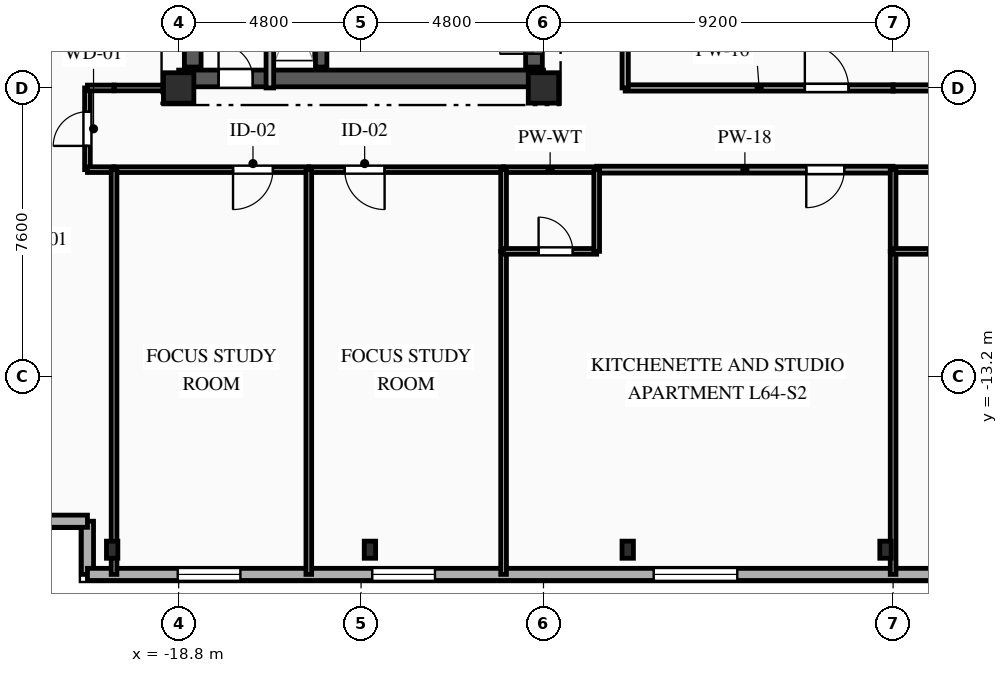
"""IFC4 building model, lengths in metres.
Left out: names, types, materials, properties, quantities, classifications, styles, units other than length and angle.
Written with IfcOpenShell. Run it as: python <this file> out.ifc"""

import sys

from ifc_helpers import new_model, si_unit, direction, frame, frame_2d, origin, origin_2d, place, context, subcontext, project, spatial, rectangle, i_section, extrude, element, fill, save


model = new_model("IFC4")
c1 = context("Model", 3, precision=1e-05, world=origin(), true_north=direction((0.0, 1.0)))
c2 = subcontext(c1, "Body", "Model", "MODEL_VIEW")
j1 = project(units=[si_unit("LENGTHUNIT", "METRE"), si_unit("PLANEANGLEUNIT", "RADIAN")], contexts=[c1])
p1 = place(None, origin())
s1 = spatial("IfcSite", under=j1, at=p1, CompositionType="ELEMENT")
p2 = place(p1, origin())
s2 = spatial("IfcBuilding", under=s1, at=p2, CompositionType="ELEMENT")
p3 = place(p2, frame((0.0, 0.0, 228.3)))
s3 = spatial("IfcBuildingStorey", under=s2, at=p3, CompositionType="ELEMENT", Elevation=228.3)
for number, where, z_axis, x_axis in (
    (1, (-18.8, -5.6, 0.0), (0.0, 0.0, 1.0), (1.0, 0.0, 0.0)),
    (2, (-9.2, -5.6, 0.0), (0.0, 0.0, 1.0), (1.0, 0.0, 0.0)),
):
    element("IfcColumn", number, at=place(p3, frame(where, z_axis=z_axis, x_axis=x_axis)), inside=s3, PredefinedType="COLUMN", context=c2, shape_type="SweptSolid", body=[
        extrude(rectangle(XDim=0.8, YDim=0.8, at=origin_2d()), origin(), (0.0, 0.0, 1.0), 3.35),
    ])
for number, where, z_axis, x_axis in (
    (3, (-20.55, -17.75, 0.0), (0.0, 0.0, 1.0), (1.0, 0.0, 0.0)),
    (4, (-13.767, -17.75, 0.0), (0.0, 0.0, 1.0), (1.0, 0.0, 0.0)),
    (5, (-6.983, -17.75, 0.0), (0.0, 0.0, 1.0), (1.0, 0.0, 0.0)),
    (6, (-0.2, -17.75, 0.0), (0.0, 0.0, 1.0), (1.0, 0.0, 0.0)),
):
    element("IfcColumn", number, at=place(p3, frame(where, z_axis=z_axis, x_axis=x_axis)), inside=s3, PredefinedType="COLUMN", context=c2, shape_type="SweptSolid", body=[
        extrude(i_section(OverallWidth=0.3, OverallDepth=0.45, WebThickness=0.014, FlangeThickness=0.026, FilletRadius=0.027, at=origin_2d()), origin(), (0.0, 0.0, 1.0), 3.35),
    ])
p4 = place(p3, frame((-21.2, -18.4, 0.0), z_axis=(0.0, 0.0, 1.0), x_axis=(0.0, 1.0, 0.0)))
e7 = element("IfcWall", 7, at=p4, inside=s3, PredefinedType="SOLIDWALL", context=c2, shape_type="SweptSolid", body=[
    extrude(rectangle(XDim=1.4, YDim=0.32, at=frame_2d((0.7, 0.0))), origin(), (0.0, 0.0, 1.0), 3.04),
])
p5 = place(p3, frame((-21.2, -17.0, 0.0), z_axis=(0.0, 0.0, 1.0), x_axis=(-1.0, 0.0, 0.0)))
e8 = element("IfcWall", 8, at=p5, inside=s3, PredefinedType="SOLIDWALL", context=c2, shape_type="SweptSolid", body=[
    extrude(rectangle(XDim=1.4, YDim=0.32, at=frame_2d((0.7, 0.0))), origin(), (0.0, 0.0, 1.0), 3.04),
])
p6 = place(p3, frame((20.8, -18.4, 0.0), z_axis=(0.0, 0.0, 1.0), x_axis=(-1.0, 0.0, 0.0)))
e9 = element("IfcWall", 9, at=p6, inside=s3, PredefinedType="SOLIDWALL", context=c2, shape_type="SweptSolid", body=[
    extrude(rectangle(XDim=42.0, YDim=0.32, at=frame_2d((21.0, 0.0))), origin(), (0.0, 0.0, 1.0), 3.04),
])
p7 = place(p6, frame((2.135, 0.0, 0.85)))
e10 = element("IfcOpeningElement", 10, at=p7, cuts=e9, PredefinedType="OPENING", context=c2, shape_type="SweptSolid", body=[
    extrude(rectangle(XDim=1.65, YDim=1.85, at=frame_2d((0.825, 0.925))), frame((0.0, 0.17, 0.0), z_axis=(0.0, -1.0, 0.0), x_axis=(1.0, 0.0, 0.0)), (0.0, 0.0, 1.0), 0.34),
])
p8 = place(p6, frame((7.175, 0.0, 0.85)))
e11 = element("IfcOpeningElement", 11, at=p8, cuts=e9, PredefinedType="OPENING", context=c2, shape_type="SweptSolid", body=[
    extrude(rectangle(XDim=1.65, YDim=1.85, at=frame_2d((0.825, 0.925))), frame((0.0, 0.17, 0.0), z_axis=(0.0, -1.0, 0.0), x_axis=(1.0, 0.0, 0.0)), (0.0, 0.0, 1.0), 0.34),
])
p9 = place(p6, frame((14.58, 0.0, 0.85)))
e12 = element("IfcOpeningElement", 12, at=p9, cuts=e9, PredefinedType="OPENING", context=c2, shape_type="SweptSolid", body=[
    extrude(rectangle(XDim=2.2, YDim=1.85, at=frame_2d((1.1, 0.925))), frame((0.0, 0.17, 0.0), z_axis=(0.0, -1.0, 0.0), x_axis=(1.0, 0.0, 0.0)), (0.0, 0.0, 1.0), 0.34),
])
p10 = place(p6, frame((24.9, 0.0, 0.85)))
e13 = element("IfcOpeningElement", 13, at=p10, cuts=e9, PredefinedType="OPENING", context=c2, shape_type="SweptSolid", body=[
    extrude(rectangle(XDim=2.2, YDim=1.85, at=frame_2d((1.1, 0.925))), frame((0.0, 0.17, 0.0), z_axis=(0.0, -1.0, 0.0), x_axis=(1.0, 0.0, 0.0)), (0.0, 0.0, 1.0), 0.34),
])
p11 = place(p6, frame((32.855, 0.0, 0.85)))
e14 = element("IfcOpeningElement", 14, at=p11, cuts=e9, PredefinedType="OPENING", context=c2, shape_type="SweptSolid", body=[
    extrude(rectangle(XDim=1.65, YDim=1.85, at=frame_2d((0.825, 0.925))), frame((0.0, 0.17, 0.0), z_axis=(0.0, -1.0, 0.0), x_axis=(1.0, 0.0, 0.0)), (0.0, 0.0, 1.0), 0.34),
])
p12 = place(p6, frame((37.975, 0.0, 0.85)))
e15 = element("IfcOpeningElement", 15, at=p12, cuts=e9, PredefinedType="OPENING", context=c2, shape_type="SweptSolid", body=[
    extrude(rectangle(XDim=1.65, YDim=1.85, at=frame_2d((0.825, 0.925))), frame((0.0, 0.17, 0.0), z_axis=(0.0, -1.0, 0.0), x_axis=(1.0, 0.0, 0.0)), (0.0, 0.0, 1.0), 0.34),
])
p13 = place(p3, frame((-18.8, -5.35, 0.0), z_axis=(0.0, 0.0, 1.0), x_axis=(1.0, 0.0, 0.0)))
e16 = element("IfcWall", 16, at=p13, inside=s3, PredefinedType="SHEAR", context=c2, shape_type="SweptSolid", body=[
    extrude(rectangle(XDim=9.6, YDim=0.44, at=frame_2d((4.8, 0.0))), origin(), (0.0, 0.0, 1.0), 3.04),
])
p14 = place(p13, frame((1.05, 0.0, 0.0)))
e17 = element("IfcOpeningElement", 17, at=p14, cuts=e16, PredefinedType="OPENING", context=c2, shape_type="SweptSolid", body=[
    extrude(rectangle(XDim=0.9, YDim=2.1, at=frame_2d((0.45, 1.05))), frame((0.0, 0.23, 0.0), z_axis=(0.0, -1.0, 0.0), x_axis=(1.0, 0.0, 0.0)), (0.0, 0.0, 1.0), 0.46),
])
p15 = place(p3, frame((-18.43, -5.05, 0.0), z_axis=(0.0, 0.0, 1.0), x_axis=(0.0, 1.0, 0.0)))
e18 = element("IfcWall", 18, at=p15, inside=s3, PredefinedType="SHEAR", context=c2, shape_type="SweptSolid", body=[
    extrude(rectangle(XDim=10.1, YDim=0.44, at=frame_2d((5.05, 0.0))), origin(), (0.0, 0.0, 1.0), 3.04),
])
p16 = place(p3, frame((-9.45, -5.05, 0.0), z_axis=(0.0, 0.0, 1.0), x_axis=(0.0, 1.0, 0.0)))
e19 = element("IfcWall", 19, at=p16, inside=s3, PredefinedType="SHEAR", context=c2, shape_type="SweptSolid", body=[
    extrude(rectangle(XDim=10.1, YDim=0.44, at=frame_2d((5.05, 0.0))), origin(), (0.0, 0.0, 1.0), 3.04),
])
p17 = place(p16, frame((7.175, 0.0, 0.0)))
e20 = element("IfcOpeningElement", 20, at=p17, cuts=e19, PredefinedType="OPENING", context=c2, shape_type="SweptSolid", body=[
    extrude(rectangle(XDim=0.9, YDim=2.1, at=frame_2d((0.45, 1.05))), frame((0.0, 0.23, 0.0), z_axis=(0.0, -1.0, 0.0), x_axis=(1.0, 0.0, 0.0)), (0.0, 0.0, 1.0), 0.46),
])
p18 = place(p16, frame((2.4, 0.0, 0.0)))
e21 = element("IfcOpeningElement", 21, at=p18, cuts=e19, PredefinedType="OPENING", context=c2, shape_type="SweptSolid", body=[
    extrude(rectangle(XDim=1.2, YDim=2.15, at=frame_2d((0.6, 1.075))), frame((0.0, 0.23, 0.0), z_axis=(0.0, -1.0, 0.0), x_axis=(1.0, 0.0, 0.0)), (0.0, 0.0, 1.0), 0.46),
])
p19 = place(p16, frame((0.35, 0.0, 0.0)))
e22 = element("IfcOpeningElement", 22, at=p19, cuts=e19, PredefinedType="OPENING", context=c2, shape_type="SweptSolid", body=[
    extrude(rectangle(XDim=0.9, YDim=2.1, at=frame_2d((0.45, 1.05))), frame((0.0, 0.23, 0.0), z_axis=(0.0, -1.0, 0.0), x_axis=(1.0, 0.0, 0.0)), (0.0, 0.0, 1.0), 0.46),
])
p20 = place(p16, frame((5.0, 0.0, 0.0)))
e23 = element("IfcOpeningElement", 23, at=p20, cuts=e19, PredefinedType="OPENING", context=c2, shape_type="SweptSolid", body=[
    extrude(rectangle(XDim=0.9, YDim=2.1, at=frame_2d((0.45, 1.05))), frame((0.0, 0.23, 0.0), z_axis=(0.0, -1.0, 0.0), x_axis=(1.0, 0.0, 0.0)), (0.0, 0.0, 1.0), 0.46),
])
p21 = place(p3, frame((-15.05, -5.05, 0.0), z_axis=(0.0, 0.0, 1.0), x_axis=(0.0, 1.0, 0.0)))
e24 = element("IfcWall", 24, at=p21, inside=s3, PredefinedType="SHEAR", context=c2, shape_type="SweptSolid", body=[
    extrude(rectangle(XDim=10.1, YDim=0.3, at=frame_2d((5.05, 0.0))), origin(), (0.0, 0.0, 1.0), 3.04),
])
p22 = place(p3, frame((-16.4, -5.6, 0.0), z_axis=(0.0, 0.0, 1.0), x_axis=(0.0, 1.0, 0.0)))
e25 = element("IfcWall", 25, at=p22, inside=s3, PredefinedType="PARTITIONING", context=c2, shape_type="SweptSolid", body=[
    extrude(rectangle(XDim=3.49, YDim=0.2, at=frame_2d((1.745, 0.0))), origin(), (0.0, 0.0, 1.0), 3.04),
])
p23 = place(p3, frame((-21.2, -7.75, 0.0), z_axis=(0.0, 0.0, 1.0), x_axis=(0.0, 1.0, 0.0)))
e26 = element("IfcWall", 26, at=p23, inside=s3, PredefinedType="PARTITIONING", context=c2, shape_type="SweptSolid", body=[
    extrude(rectangle(XDim=2.15, YDim=0.15, at=frame_2d((1.075, 0.0))), origin(), (0.0, 0.0, 1.0), 2.695),
])
p24 = place(p23, frame((0.625, 0.0, 0.0)))
e27 = element("IfcOpeningElement", 27, at=p24, cuts=e26, PredefinedType="OPENING", context=c2, shape_type="SweptSolid", body=[
    extrude(rectangle(XDim=0.9, YDim=2.1, at=frame_2d((0.45, 1.05))), frame((0.0, 0.085, 0.0), z_axis=(0.0, -1.0, 0.0), x_axis=(1.0, 0.0, 0.0)), (0.0, 0.0, 1.0), 0.17),
])
p25 = place(p3, frame((-20.5, -5.6, 0.0), z_axis=(0.0, 0.0, 1.0), x_axis=(1.0, 0.0, 0.0)))
e28 = element("IfcWall", 28, at=p25, inside=s3, PredefinedType="PARTITIONING", context=c2, shape_type="SweptSolid", body=[
    extrude(rectangle(XDim=1.7, YDim=0.15, at=frame_2d((0.85, 0.0))), origin(), (0.0, 0.0, 1.0), 3.04),
])
for number, where, z_axis, x_axis in (
    (29, (-20.5, -7.75, 0.0), (0.0, 0.0, 1.0), (-1.0, 0.0, 0.0)),
    (30, (-21.2, -5.6, 0.0), (0.0, 0.0, 1.0), (1.0, 0.0, 0.0)),
):
    element("IfcWall", number, at=place(p3, frame(where, z_axis=z_axis, x_axis=x_axis)), inside=s3, PredefinedType="PARTITIONING", context=c2, shape_type="SweptSolid", body=[
        extrude(rectangle(XDim=0.7, YDim=0.15, at=frame_2d((0.35, 0.0))), origin(), (0.0, 0.0, 1.0), 3.04),
    ])
p26 = place(p3, frame((-15.375, -7.75, 0.0), z_axis=(0.0, 0.0, 1.0), x_axis=(-1.0, 0.0, 0.0)))
e31 = element("IfcWall", 31, at=p26, inside=s3, PredefinedType="PARTITIONING", context=c2, shape_type="SweptSolid", body=[
    extrude(rectangle(XDim=5.125, YDim=0.15, at=frame_2d((2.562, 0.0))), origin(), (0.0, 0.0, 1.0), 3.04),
])
p27 = place(p26, frame((0.944, 0.0, 0.0)))
e32 = element("IfcOpeningElement", 32, at=p27, cuts=e31, PredefinedType="OPENING", context=c2, shape_type="SweptSolid", body=[
    extrude(rectangle(XDim=1.05, YDim=2.15, at=frame_2d((0.525, 1.075))), frame((0.0, 0.085, 0.0), z_axis=(0.0, -1.0, 0.0), x_axis=(1.0, 0.0, 0.0)), (0.0, 0.0, 1.0), 0.17),
])
p28 = place(p3, frame((-10.25, -7.75, 0.0), z_axis=(0.0, 0.0, 1.0), x_axis=(-1.0, 0.0, 0.0)))
e33 = element("IfcWall", 33, at=p28, inside=s3, PredefinedType="PARTITIONING", context=c2, shape_type="SweptSolid", body=[
    extrude(rectangle(XDim=5.125, YDim=0.15, at=frame_2d((2.562, 0.0))), origin(), (0.0, 0.0, 1.0), 3.04),
])
p29 = place(p28, frame((3.131, 0.0, 0.0)))
e34 = element("IfcOpeningElement", 34, at=p29, cuts=e33, PredefinedType="OPENING", context=c2, shape_type="SweptSolid", body=[
    extrude(rectangle(XDim=1.05, YDim=2.15, at=frame_2d((0.525, 1.075))), frame((0.0, 0.085, 0.0), z_axis=(0.0, -1.0, 0.0), x_axis=(1.0, 0.0, 0.0)), (0.0, 0.0, 1.0), 0.17),
])
p30 = place(p3, frame((0.0, -7.75, 0.0), z_axis=(0.0, 0.0, 1.0), x_axis=(-1.0, 0.0, 0.0)))
e35 = element("IfcWall", 35, at=p30, inside=s3, PredefinedType="PARTITIONING", context=c2, shape_type="SweptSolid", body=[
    extrude(rectangle(XDim=7.8, YDim=0.18, at=frame_2d((3.9, 0.0))), origin(), (0.0, 0.0, 1.0), 3.04),
])
p31 = place(p30, frame((1.285, 0.0, 0.0)))
e36 = element("IfcOpeningElement", 36, at=p31, cuts=e35, PredefinedType="OPENING", context=c2, shape_type="SweptSolid", body=[
    extrude(rectangle(XDim=1.0, YDim=2.15, at=frame_2d((0.5, 1.075))), frame((0.0, 0.1, 0.0), z_axis=(0.0, -1.0, 0.0), x_axis=(1.0, 0.0, 0.0)), (0.0, 0.0, 1.0), 0.2),
])
p32 = place(p3, frame((-7.8, -7.75, 0.0), z_axis=(0.0, 0.0, 1.0), x_axis=(-1.0, 0.0, 0.0)))
e37 = element("IfcWall", 37, at=p32, inside=s3, PredefinedType="PLUMBINGWALL", context=c2, shape_type="SweptSolid", body=[
    extrude(rectangle(XDim=2.45, YDim=0.15, at=frame_2d((1.225, 0.0))), origin(), (0.0, 0.0, 1.0), 3.04),
])
p33 = place(p3, frame((-7.05, -5.6, 0.0), z_axis=(0.0, 0.0, 1.0), x_axis=(1.0, 0.0, 0.0)))
e38 = element("IfcWall", 38, at=p33, inside=s3, PredefinedType="PARTITIONING", context=c2, shape_type="SweptSolid", body=[
    extrude(rectangle(XDim=7.05, YDim=0.165, at=frame_2d((3.525, 0.0))), origin(), (0.0, 0.0, 1.0), 2.525),
])
p34 = place(p33, frame((4.728, 0.0, 0.0)))
e39 = element("IfcOpeningElement", 39, at=p34, cuts=e38, PredefinedType="OPENING", context=c2, shape_type="SweptSolid", body=[
    extrude(rectangle(XDim=1.15, YDim=2.15, at=frame_2d((0.575, 1.075))), frame((0.0, 0.093, 0.0), z_axis=(0.0, -1.0, 0.0), x_axis=(1.0, 0.0, 0.0)), (0.0, 0.0, 1.0), 0.185),
])
p35 = place(p3, frame((2.45, -7.75, 0.0), z_axis=(0.0, 0.0, 1.0), x_axis=(-1.0, 0.0, 0.0)))
e40 = element("IfcWall", 40, at=p35, inside=s3, PredefinedType="PLUMBINGWALL", context=c2, shape_type="SweptSolid", body=[
    extrude(rectangle(XDim=2.45, YDim=0.15, at=frame_2d((1.225, 0.0))), origin(), (0.0, 0.0, 1.0), 3.04),
])
p36 = place(p3, frame((0.0, -5.6, 0.0), z_axis=(0.0, 0.0, 1.0), x_axis=(1.0, 0.0, 0.0)))
e41 = element("IfcWall", 41, at=p36, inside=s3, PredefinedType="PARTITIONING", context=c2, shape_type="SweptSolid", body=[
    extrude(rectangle(XDim=7.05, YDim=0.165, at=frame_2d((3.525, 0.0))), origin(), (0.0, 0.0, 1.0), 2.525),
])
p37 = place(p3, frame((-7.05, 1.45, 0.0), z_axis=(0.0, 0.0, 1.0), x_axis=(0.0, -1.0, 0.0)))
e42 = element("IfcWall", 42, at=p37, inside=s3, PredefinedType="PARTITIONING", context=c2, shape_type="SweptSolid", body=[
    extrude(rectangle(XDim=7.05, YDim=0.165, at=frame_2d((3.525, 0.0))), origin(), (0.0, 0.0, 1.0), 3.04),
])
p38 = place(p3, frame((-20.5, -7.75, 0.0), z_axis=(0.0, 0.0, 1.0), x_axis=(0.0, -1.0, 0.0)))
e43 = element("IfcWall", 43, at=p38, inside=s3, PredefinedType="PARTITIONING", context=c2, shape_type="SweptSolid", body=[
    extrude(rectangle(XDim=10.65, YDim=0.15, at=frame_2d((5.325, 0.0))), origin(), (0.0, 0.0, 1.0), 2.665),
])
p39 = place(p3, frame((-15.375, -7.75, 0.0), z_axis=(0.0, 0.0, 1.0), x_axis=(0.0, -1.0, 0.0)))
e44 = element("IfcWall", 44, at=p39, inside=s3, PredefinedType="PARTITIONING", context=c2, shape_type="SweptSolid", body=[
    extrude(rectangle(XDim=10.65, YDim=0.15, at=frame_2d((5.325, 0.0))), origin(), (0.0, 0.0, 1.0), 3.04),
])
p40 = place(p3, frame((-10.25, -9.9, 0.0), z_axis=(0.0, 0.0, 1.0), x_axis=(0.0, -1.0, 0.0)))
e45 = element("IfcWall", 45, at=p40, inside=s3, PredefinedType="PARTITIONING", context=c2, shape_type="SweptSolid", body=[
    extrude(rectangle(XDim=8.5, YDim=0.15, at=frame_2d((4.25, 0.0))), origin(), (0.0, 0.0, 1.0), 3.04),
])
p41 = place(p3, frame((-10.25, -7.75, 0.0), z_axis=(0.0, 0.0, 1.0), x_axis=(0.0, -1.0, 0.0)))
e46 = element("IfcWall", 46, at=p41, inside=s3, PredefinedType="PLUMBINGWALL", context=c2, shape_type="SweptSolid", body=[
    extrude(rectangle(XDim=2.15, YDim=0.15, at=frame_2d((1.075, 0.0))), origin(), (0.0, 0.0, 1.0), 3.04),
])
p42 = place(p3, frame((-10.25, -9.9, 0.0), z_axis=(0.0, 0.0, 1.0), x_axis=(1.0, 0.0, 0.0)))
e47 = element("IfcWall", 47, at=p42, inside=s3, PredefinedType="PLUMBINGWALL", context=c2, shape_type="SweptSolid", body=[
    extrude(rectangle(XDim=2.45, YDim=0.15, at=frame_2d((1.225, 0.0))), origin(), (0.0, 0.0, 1.0), 3.04),
])
p43 = place(p42, frame((0.921, 0.0, 0.0)))
e48 = element("IfcOpeningElement", 48, at=p43, cuts=e47, PredefinedType="OPENING", context=c2, shape_type="SweptSolid", body=[
    extrude(rectangle(XDim=0.9, YDim=2.1, at=frame_2d((0.45, 1.05))), frame((0.0, 0.085, 0.0), z_axis=(0.0, -1.0, 0.0), x_axis=(1.0, 0.0, 0.0)), (0.0, 0.0, 1.0), 0.17),
])
p44 = place(p3, frame((-7.8, -9.9, 0.0), z_axis=(0.0, 0.0, 1.0), x_axis=(0.0, 1.0, 0.0)))
e49 = element("IfcWall", 49, at=p44, inside=s3, PredefinedType="PLUMBINGWALL", context=c2, shape_type="SweptSolid", body=[
    extrude(rectangle(XDim=2.15, YDim=0.15, at=frame_2d((1.075, 0.0))), origin(), (0.0, 0.0, 1.0), 3.04),
])
p45 = place(p3, frame((0.0, -9.9, 0.0), z_axis=(0.0, 0.0, 1.0), x_axis=(0.0, -1.0, 0.0)))
e50 = element("IfcWall", 50, at=p45, inside=s3, PredefinedType="PARTITIONING", context=c2, shape_type="SweptSolid", body=[
    extrude(rectangle(XDim=8.5, YDim=0.15, at=frame_2d((4.25, 0.0))), origin(), (0.0, 0.0, 1.0), 3.04),
])
p46 = place(p3, frame((0.0, -7.75, 0.0), z_axis=(0.0, 0.0, 1.0), x_axis=(0.0, -1.0, 0.0)))
e51 = element("IfcWall", 51, at=p46, inside=s3, PredefinedType="PLUMBINGWALL", context=c2, shape_type="SweptSolid", body=[
    extrude(rectangle(XDim=2.15, YDim=0.15, at=frame_2d((1.075, 0.0))), origin(), (0.0, 0.0, 1.0), 3.04),
])
p47 = place(p3, frame((0.0, -9.9, 0.0), z_axis=(0.0, 0.0, 1.0), x_axis=(1.0, 0.0, 0.0)))
e52 = element("IfcWall", 52, at=p47, inside=s3, PredefinedType="PLUMBINGWALL", context=c2, shape_type="SweptSolid", body=[
    extrude(rectangle(XDim=2.45, YDim=0.15, at=frame_2d((1.225, 0.0))), origin(), (0.0, 0.0, 1.0), 3.04),
])
p48 = place(p47, frame((0.921, 0.0, 0.0)))
e53 = element("IfcOpeningElement", 53, at=p48, cuts=e52, PredefinedType="OPENING", context=c2, shape_type="SweptSolid", body=[
    extrude(rectangle(XDim=0.9, YDim=2.1, at=frame_2d((0.45, 1.05))), frame((0.0, 0.085, 0.0), z_axis=(0.0, -1.0, 0.0), x_axis=(1.0, 0.0, 0.0)), (0.0, 0.0, 1.0), 0.17),
])
p49 = place(p10, origin())
e54 = element("IfcWindow", 54, at=p49, inside=s3, PartitioningType="SINGLE_PANEL", PredefinedType="WINDOW", context=c2, shape_type="SweptSolid", body=[
    extrude(rectangle(XDim=2.2, YDim=1.85, at=frame_2d((1.1, 0.925))), frame((0.0, 0.03, 0.0), z_axis=(0.0, -1.0, 0.0), x_axis=(1.0, 0.0, 0.0)), (0.0, 0.0, 1.0), 0.06),
])
fill(e13, e54)
p50 = place(p11, origin())
e55 = element("IfcWindow", 55, at=p50, inside=s3, PartitioningType="SINGLE_PANEL", PredefinedType="WINDOW", context=c2, shape_type="SweptSolid", body=[
    extrude(rectangle(XDim=1.65, YDim=1.85, at=frame_2d((0.825, 0.925))), frame((0.0, 0.03, 0.0), z_axis=(0.0, -1.0, 0.0), x_axis=(1.0, 0.0, 0.0)), (0.0, 0.0, 1.0), 0.06),
])
fill(e14, e55)
p51 = place(p12, origin())
e56 = element("IfcWindow", 56, at=p51, inside=s3, PartitioningType="SINGLE_PANEL", PredefinedType="WINDOW", context=c2, shape_type="SweptSolid", body=[
    extrude(rectangle(XDim=1.65, YDim=1.85, at=frame_2d((0.825, 0.925))), frame((0.0, 0.03, 0.0), z_axis=(0.0, -1.0, 0.0), x_axis=(1.0, 0.0, 0.0)), (0.0, 0.0, 1.0), 0.06),
])
fill(e15, e56)
p52 = place(p14, origin())
e57 = element("IfcDoor", 57, at=p52, inside=s3, OperationType="SINGLE_SWING_LEFT", PredefinedType="DOOR", context=c2, shape_type="SweptSolid", body=[
    extrude(rectangle(XDim=0.9, YDim=2.1, at=frame_2d((0.45, 1.05))), frame((0.0, 0.025, 0.0), z_axis=(0.0, -1.0, 0.0), x_axis=(1.0, 0.0, 0.0)), (0.0, 0.0, 1.0), 0.05),
])
fill(e17, e57)
p53 = place(p19, origin())
e58 = element("IfcDoor", 58, at=p53, inside=s3, OperationType="SINGLE_SWING_LEFT", PredefinedType="DOOR", context=c2, shape_type="SweptSolid", body=[
    extrude(rectangle(XDim=0.9, YDim=2.1, at=frame_2d((0.45, 1.05))), frame((0.0, 0.025, 0.0), z_axis=(0.0, -1.0, 0.0), x_axis=(1.0, 0.0, 0.0)), (0.0, 0.0, 1.0), 0.05),
])
fill(e22, e58)
p54 = place(p24, origin())
e59 = element("IfcDoor", 59, at=p54, inside=s3, OperationType="SINGLE_SWING_LEFT", PredefinedType="DOOR", context=c2, shape_type="SweptSolid", body=[
    extrude(rectangle(XDim=0.9, YDim=2.1, at=frame_2d((0.45, 1.05))), frame((0.0, 0.025, 0.0), z_axis=(0.0, -1.0, 0.0), x_axis=(1.0, 0.0, 0.0)), (0.0, 0.0, 1.0), 0.05),
])
fill(e27, e59)
p55 = place(p27, origin())
e60 = element("IfcDoor", 60, at=p55, inside=s3, OperationType="SINGLE_SWING_RIGHT", PredefinedType="DOOR", context=c2, shape_type="SweptSolid", body=[
    extrude(rectangle(XDim=1.05, YDim=2.15, at=frame_2d((0.525, 1.075))), frame((0.0, 0.025, 0.0), z_axis=(0.0, -1.0, 0.0), x_axis=(1.0, 0.0, 0.0)), (0.0, 0.0, 1.0), 0.05),
])
fill(e32, e60)
p56 = place(p29, origin())
e61 = element("IfcDoor", 61, at=p56, inside=s3, OperationType="SINGLE_SWING_LEFT", PredefinedType="DOOR", context=c2, shape_type="SweptSolid", body=[
    extrude(rectangle(XDim=1.05, YDim=2.15, at=frame_2d((0.525, 1.075))), frame((0.0, 0.025, 0.0), z_axis=(0.0, -1.0, 0.0), x_axis=(1.0, 0.0, 0.0)), (0.0, 0.0, 1.0), 0.05),
])
fill(e34, e61)
p57 = place(p31, origin())
e62 = element("IfcDoor", 62, at=p57, inside=s3, OperationType="SINGLE_SWING_RIGHT", PredefinedType="DOOR", context=c2, shape_type="SweptSolid", body=[
    extrude(rectangle(XDim=1.0, YDim=2.15, at=frame_2d((0.5, 1.075))), frame((0.0, 0.025, 0.0), z_axis=(0.0, -1.0, 0.0), x_axis=(1.0, 0.0, 0.0)), (0.0, 0.0, 1.0), 0.05),
])
fill(e36, e62)
p58 = place(p34, origin())
e63 = element("IfcDoor", 63, at=p58, inside=s3, OperationType="SINGLE_SWING_LEFT", PredefinedType="DOOR", context=c2, shape_type="SweptSolid", body=[
    extrude(rectangle(XDim=1.15, YDim=2.15, at=frame_2d((0.575, 1.075))), frame((0.0, 0.025, 0.0), z_axis=(0.0, -1.0, 0.0), x_axis=(1.0, 0.0, 0.0)), (0.0, 0.0, 1.0), 0.05),
])
fill(e39, e63)
p59 = place(p43, origin())
e64 = element("IfcDoor", 64, at=p59, inside=s3, OperationType="SINGLE_SWING_LEFT", PredefinedType="DOOR", context=c2, shape_type="SweptSolid", body=[
    extrude(rectangle(XDim=0.9, YDim=2.1, at=frame_2d((0.45, 1.05))), frame((0.0, 0.025, 0.0), z_axis=(0.0, -1.0, 0.0), x_axis=(1.0, 0.0, 0.0)), (0.0, 0.0, 1.0), 0.05),
])
fill(e48, e64)
p60 = place(p48, origin())
e65 = element("IfcDoor", 65, at=p60, inside=s3, OperationType="SINGLE_SWING_RIGHT", PredefinedType="DOOR", context=c2, shape_type="SweptSolid", body=[
    extrude(rectangle(XDim=0.9, YDim=2.1, at=frame_2d((0.45, 1.05))), frame((0.0, 0.025, 0.0), z_axis=(0.0, -1.0, 0.0), x_axis=(1.0, 0.0, 0.0)), (0.0, 0.0, 1.0), 0.05),
])
fill(e53, e65)
save(model, sys.argv[1])
